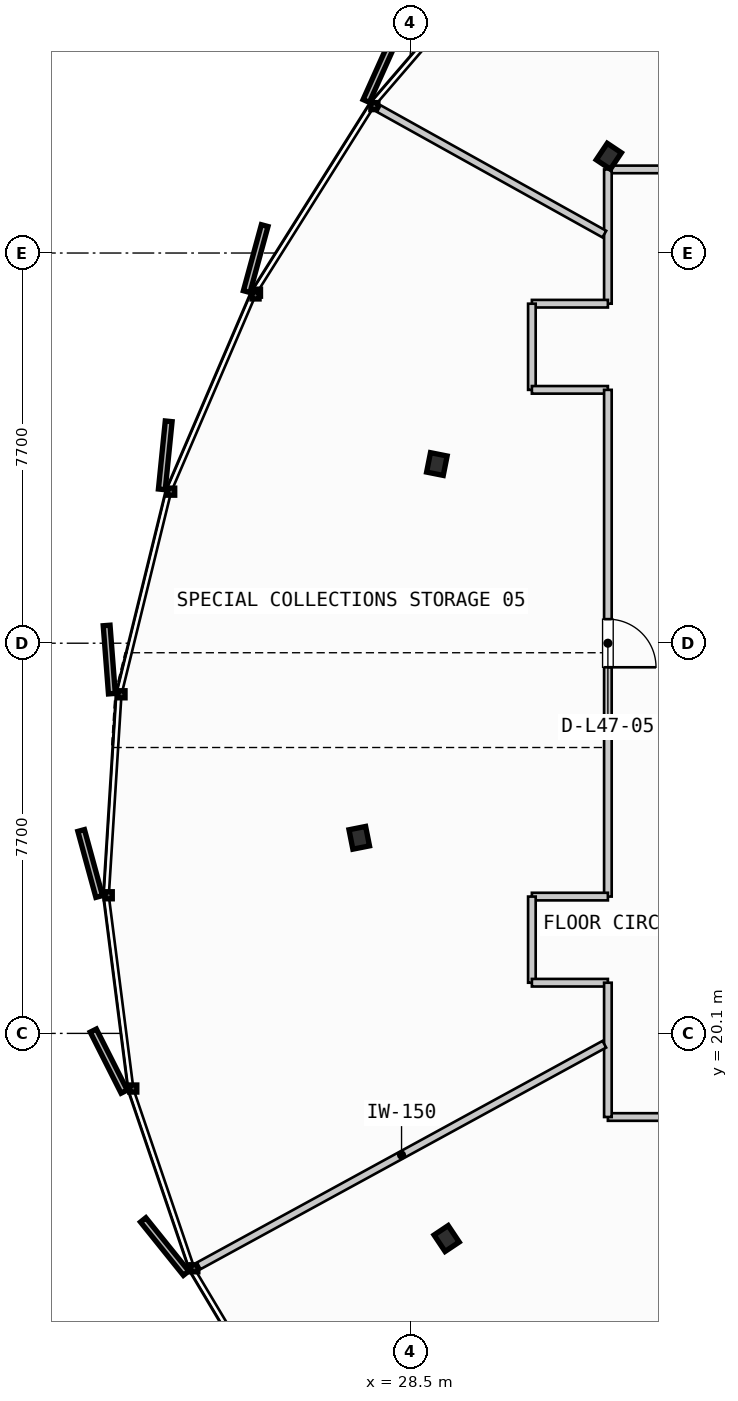
"""IFC4 building model, lengths in metres.
Left out: names, types, materials, properties, quantities, classifications, styles, units other than length and angle.
Written with IfcOpenShell. Run it as: python <this file> out.ifc"""

import sys

from ifc_helpers import new_model, si_unit, direction, frame, frame_2d, origin, origin_2d, place, context, subcontext, project, spatial, rectangle, i_section, extrude, source, transform, mapped, element, fill, save


model = new_model("IFC4")
c1 = context("Model", 3, precision=1e-05, world=origin(), true_north=direction((0.0, 1.0)))
c2 = subcontext(c1, "Body", "Model", "MODEL_VIEW")
j1 = project(units=[si_unit("LENGTHUNIT", "METRE"), si_unit("PLANEANGLEUNIT", "RADIAN")], contexts=[c1])
p1 = place(None, origin())
s1 = spatial("IfcSite", under=j1, at=p1, CompositionType="ELEMENT")
p2 = place(p1, origin())
s2 = spatial("IfcBuilding", under=s1, at=p2, CompositionType="ELEMENT")
p3 = place(p2, frame((0.0, 0.0, 183.4)))
s3 = spatial("IfcBuildingStorey", under=s2, at=p3, CompositionType="ELEMENT", Elevation=183.4)
m1 = source(origin(), c2, "Body", "SweptSolid", [
    extrude(i_section(OverallWidth=0.391, OverallDepth=0.335, WebThickness=0.023, FlangeThickness=0.034, FilletRadius=0.015, at=origin_2d()), origin(), (0.0, 0.0, 1.0), 3.26),
])
for number, where, z_axis, x_axis in (
    (1, (32.418, 37.409, 0.0), (0.0, 0.0, 1.0), (-0.831, 0.556, 0.0)),
    (2, (29.025, 31.336, 0.0), (0.0, 0.0, 1.0), (-0.981, 0.195, 0.0)),
    (3, (27.493, 23.96, 0.0), (0.0, 0.0, 1.0), (-0.981, -0.195, 0.0)),
    (4, (29.218, 16.052, 0.0), (0.0, 0.0, 1.0), (-0.831, -0.556, 0.0)),
):
    element("IfcColumn", number, at=place(p3, frame(where, z_axis=z_axis, x_axis=x_axis)), inside=s3, PredefinedType="COLUMN", context=c2, shape_type="MappedRepresentation", body=[
        mapped(m1, transform((0.0, 0.0, 0.0), scale=1.0)),
    ])
p4 = place(p3, frame((32.4, 18.45, 0.0), z_axis=(0.0, 0.0, 1.0), x_axis=(1.0, 0.0, 0.0)))
e5 = element("IfcWall", 5, at=p4, inside=s3, PredefinedType="PARTITIONING", context=c2, shape_type="SweptSolid", body=[
    extrude(rectangle(XDim=28.35, YDim=0.15, at=frame_2d((14.175, 0.0))), origin(), (0.0, 0.0, 1.0), 2.28),
])
p5 = place(p4, frame((5.444, 0.0, 0.0)))
e6 = element("IfcOpeningElement", 6, at=p5, cuts=e5, PredefinedType="OPENING", context=c2, shape_type="SweptSolid", body=[
    extrude(rectangle(XDim=0.95, YDim=2.15, at=frame_2d((0.475, 1.075))), frame((0.0, 0.085, 0.0), z_axis=(0.0, -1.0, 0.0), x_axis=(1.0, 0.0, 0.0)), (0.0, 0.0, 1.0), 0.17),
])
p6 = place(p4, frame((19.031, 0.0, 0.0)))
e7 = element("IfcOpeningElement", 7, at=p6, cuts=e5, PredefinedType="OPENING", context=c2, shape_type="SweptSolid", body=[
    extrude(rectangle(XDim=0.95, YDim=2.15, at=frame_2d((0.475, 1.075))), frame((0.0, 0.085, 0.0), z_axis=(0.0, -1.0, 0.0), x_axis=(1.0, 0.0, 0.0)), (0.0, 0.0, 1.0), 0.17),
])
p7 = place(p3, frame((60.75, 37.15, 0.0), z_axis=(0.0, 0.0, 1.0), x_axis=(-1.0, 0.0, 0.0)))
e8 = element("IfcWall", 8, at=p7, inside=s3, PredefinedType="PARTITIONING", context=c2, shape_type="SweptSolid", body=[
    extrude(rectangle(XDim=28.35, YDim=0.15, at=frame_2d((14.175, 0.0))), origin(), (0.0, 0.0, 1.0), 2.28),
])
p8 = place(p7, frame((13.7, 0.0, 0.0)))
e9 = element("IfcOpeningElement", 9, at=p8, cuts=e8, PredefinedType="OPENING", context=c2, shape_type="SweptSolid", body=[
    extrude(rectangle(XDim=0.95, YDim=2.15, at=frame_2d((0.475, 1.075))), frame((0.0, 0.085, 0.0), z_axis=(0.0, -1.0, 0.0), x_axis=(1.0, 0.0, 0.0)), (0.0, 0.0, 1.0), 0.17),
])
p9 = place(p3, frame((32.4, 37.15, 0.0), z_axis=(0.0, 0.0, 1.0), x_axis=(0.0, -1.0, 0.0)))
e10 = element("IfcWall", 10, at=p9, inside=s3, PredefinedType="PARTITIONING", context=c2, shape_type="SweptSolid", body=[
    extrude(rectangle(XDim=2.65, YDim=0.15, at=frame_2d((1.325, 0.0))), origin(), (0.0, 0.0, 1.0), 2.28),
])
p10 = place(p3, frame((32.4, 34.5, 0.0), z_axis=(0.0, 0.0, 1.0), x_axis=(-1.0, 0.0, 0.0)))
e11 = element("IfcWall", 11, at=p10, inside=s3, PredefinedType="PARTITIONING", context=c2, shape_type="SweptSolid", body=[
    extrude(rectangle(XDim=1.5, YDim=0.15, at=frame_2d((0.75, 0.0))), origin(), (0.0, 0.0, 1.0), 2.28),
])
p11 = place(p3, frame((30.9, 34.5, 0.0), z_axis=(0.0, 0.0, 1.0), x_axis=(0.0, -1.0, 0.0)))
e12 = element("IfcWall", 12, at=p11, inside=s3, PredefinedType="PARTITIONING", context=c2, shape_type="SweptSolid", body=[
    extrude(rectangle(XDim=1.7, YDim=0.15, at=frame_2d((0.85, 0.0))), origin(), (0.0, 0.0, 1.0), 2.28),
])
p12 = place(p3, frame((30.9, 32.8, 0.0), z_axis=(0.0, 0.0, 1.0), x_axis=(1.0, 0.0, 0.0)))
e13 = element("IfcWall", 13, at=p12, inside=s3, PredefinedType="PARTITIONING", context=c2, shape_type="SweptSolid", body=[
    extrude(rectangle(XDim=1.5, YDim=0.15, at=frame_2d((0.75, 0.0))), origin(), (0.0, 0.0, 1.0), 2.28),
])
p13 = place(p3, frame((32.4, 32.8, 0.0), z_axis=(0.0, 0.0, 1.0), x_axis=(0.0, -1.0, 0.0)))
e14 = element("IfcWall", 14, at=p13, inside=s3, PredefinedType="PARTITIONING", context=c2, shape_type="SweptSolid", body=[
    extrude(rectangle(XDim=10.0, YDim=0.15, at=frame_2d((5.0, 0.0))), origin(), (0.0, 0.0, 1.0), 2.28),
])
p14 = place(p13, frame((4.525, 0.0, 0.0)))
e15 = element("IfcOpeningElement", 15, at=p14, cuts=e14, PredefinedType="OPENING", context=c2, shape_type="SweptSolid", body=[
    extrude(rectangle(XDim=0.95, YDim=2.15, at=frame_2d((0.475, 1.075))), frame((0.0, 0.085, 0.0), z_axis=(0.0, -1.0, 0.0), x_axis=(1.0, 0.0, 0.0)), (0.0, 0.0, 1.0), 0.17),
])
p15 = place(p3, frame((32.4, 22.8, 0.0), z_axis=(0.0, 0.0, 1.0), x_axis=(-1.0, 0.0, 0.0)))
e16 = element("IfcWall", 16, at=p15, inside=s3, PredefinedType="PARTITIONING", context=c2, shape_type="SweptSolid", body=[
    extrude(rectangle(XDim=1.5, YDim=0.15, at=frame_2d((0.75, 0.0))), origin(), (0.0, 0.0, 1.0), 2.28),
])
p16 = place(p3, frame((30.9, 22.8, 0.0), z_axis=(0.0, 0.0, 1.0), x_axis=(0.0, -1.0, 0.0)))
e17 = element("IfcWall", 17, at=p16, inside=s3, PredefinedType="PARTITIONING", context=c2, shape_type="SweptSolid", body=[
    extrude(rectangle(XDim=1.7, YDim=0.15, at=frame_2d((0.85, 0.0))), origin(), (0.0, 0.0, 1.0), 2.28),
])
p17 = place(p3, frame((30.9, 21.1, 0.0), z_axis=(0.0, 0.0, 1.0), x_axis=(1.0, 0.0, 0.0)))
e18 = element("IfcWall", 18, at=p17, inside=s3, PredefinedType="PARTITIONING", context=c2, shape_type="SweptSolid", body=[
    extrude(rectangle(XDim=1.5, YDim=0.15, at=frame_2d((0.75, 0.0))), origin(), (0.0, 0.0, 1.0), 2.28),
])
p18 = place(p3, frame((32.4, 21.1, 0.0), z_axis=(0.0, 0.0, 1.0), x_axis=(0.0, -1.0, 0.0)))
e19 = element("IfcWall", 19, at=p18, inside=s3, PredefinedType="PARTITIONING", context=c2, shape_type="SweptSolid", body=[
    extrude(rectangle(XDim=2.65, YDim=0.15, at=frame_2d((1.325, 0.0))), origin(), (0.0, 0.0, 1.0), 2.28),
])
p19 = place(p3, frame((32.33, 19.886, 0.0), z_axis=(0.0, 0.0, 1.0), x_axis=(-0.877565973966, -0.479455901348, 0.0)))
e20 = element("IfcWall", 20, at=p19, inside=s3, PredefinedType="PARTITIONING", context=c2, shape_type="SweptSolid", body=[
    extrude(rectangle(XDim=9.121, YDim=0.15, at=frame_2d((4.561, 0.0))), origin(), (0.0, 0.0, 1.0), 2.28),
])
p20 = place(p3, frame((32.33, 35.873, 0.0), z_axis=(0.0, 0.0, 1.0), x_axis=(-0.873799869627, 0.486285705979, 0.0)))
e21 = element("IfcWall", 21, at=p20, inside=s3, PredefinedType="PARTITIONING", context=c2, shape_type="SweptSolid", body=[
    extrude(rectangle(XDim=5.094, YDim=0.15, at=frame_2d((2.547, 0.0))), origin(), (0.0, 0.0, 1.0), 2.28),
])
m2 = source(origin(), c2, "Body", "SweptSolid", [
    extrude(rectangle(XDim=0.95, YDim=2.15, at=frame_2d((0.475, 1.075))), frame((0.0, 0.025, 0.0), z_axis=(0.0, -1.0, 0.0), x_axis=(1.0, 0.0, 0.0)), (0.0, 0.0, 1.0), 0.05),
])
p21 = place(p14, origin())
e22 = element("IfcDoor", 22, at=p21, inside=s3, OperationType="SINGLE_SWING_RIGHT", PredefinedType="DOOR", context=c2, shape_type="MappedRepresentation", body=[
    mapped(m2, transform((0.0, 0.0, 0.0), scale=1.0)),
])
fill(e15, e22)
save(model, sys.argv[1])
